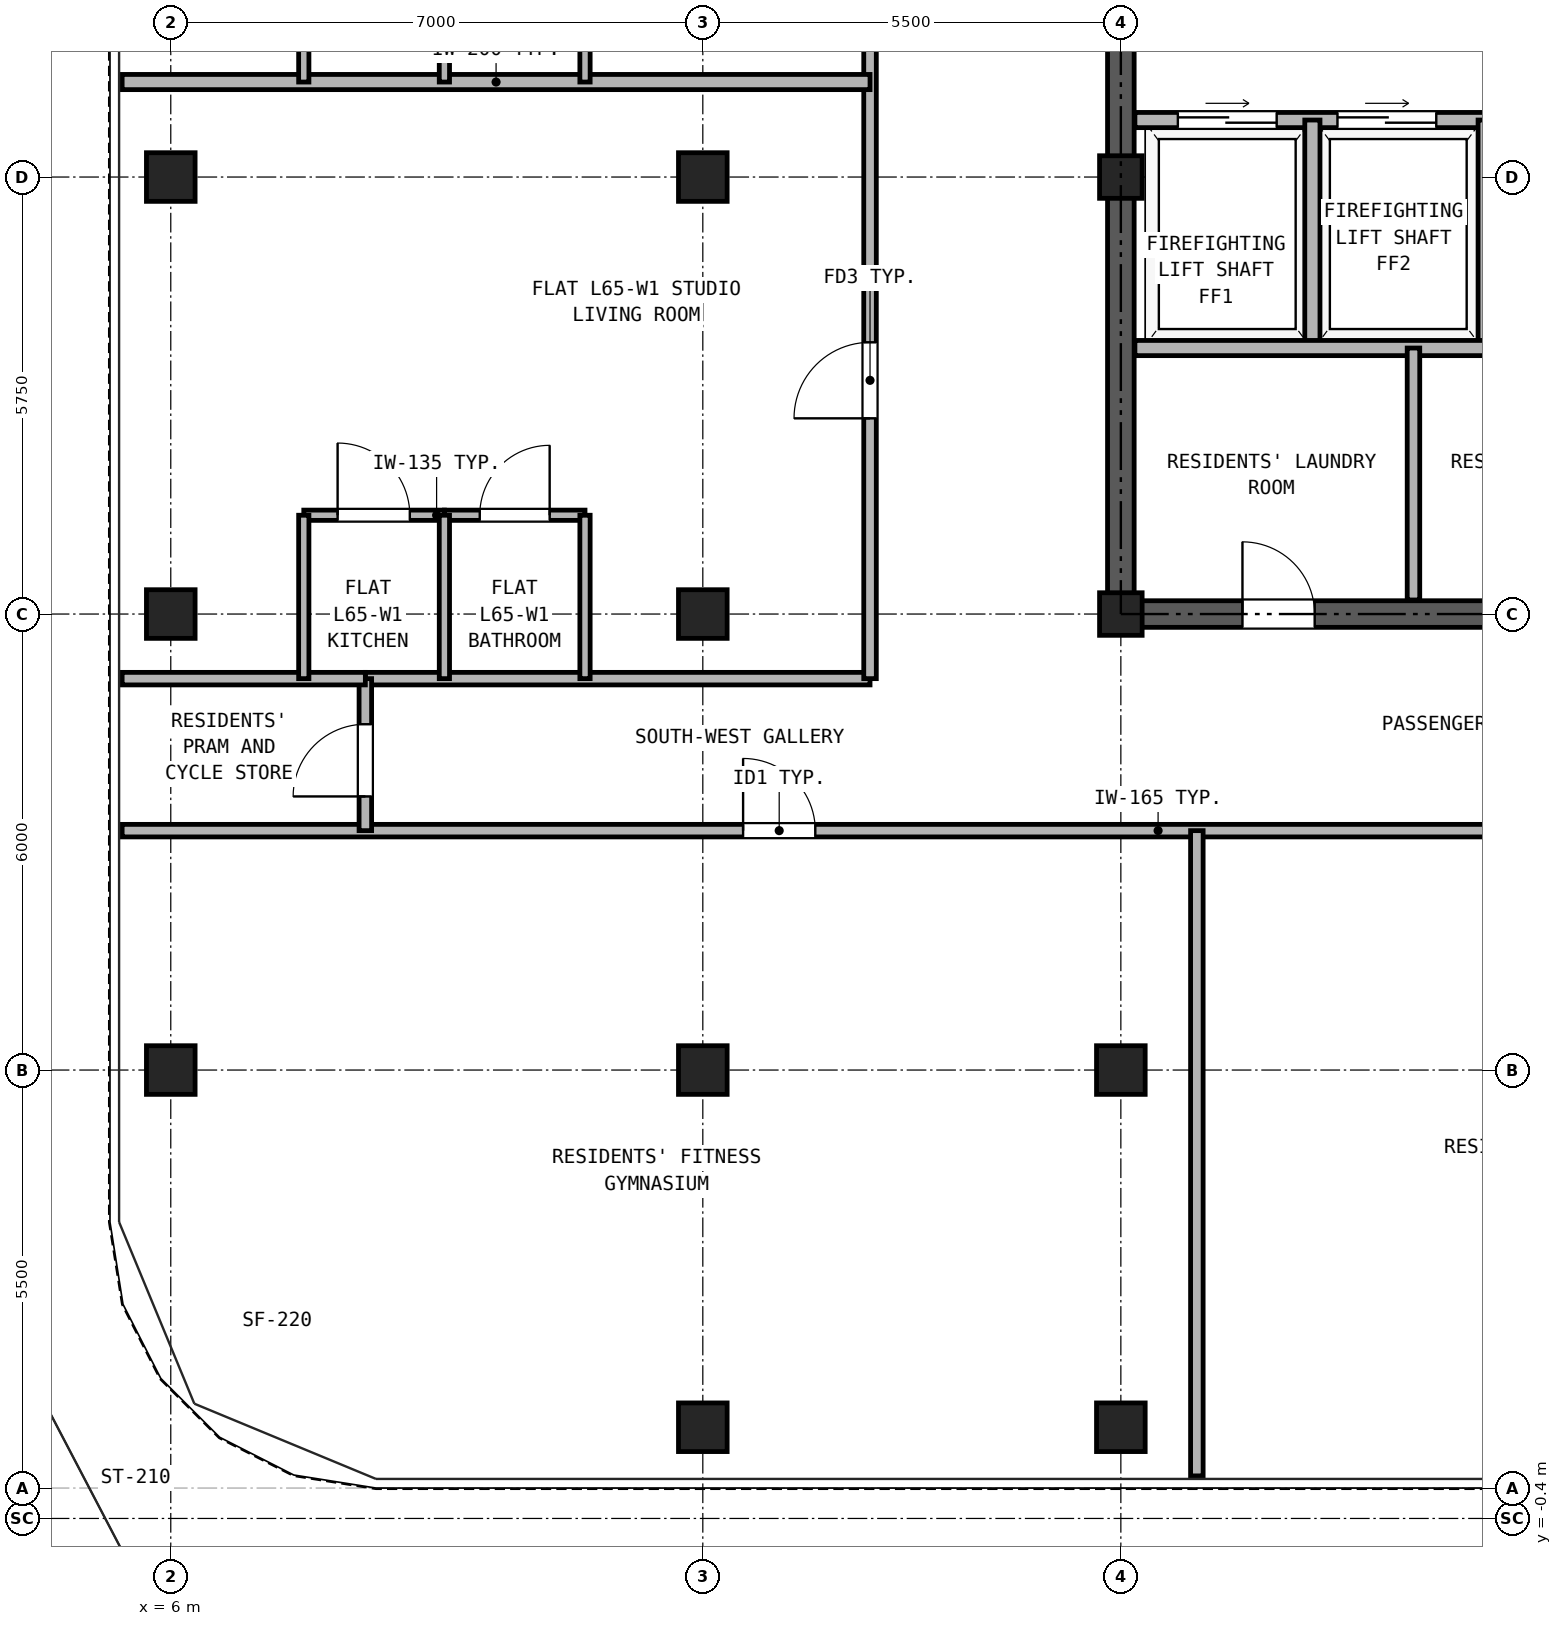
"""IFC4 building model, lengths in metres.
Left out: names, types, materials, properties, quantities, classifications, styles, units other than length and angle.
Written with IfcOpenShell. Run it as: python <this file> out.ifc"""

import sys

from ifc_helpers import new_model, si_unit, direction, frame, frame_2d, origin, origin_2d, place, context, subcontext, project, spatial, rectangle, hollow_rectangle, extrude, source, transform, mapped, element, fill, save


model = new_model("IFC4")
c1 = context("Model", 3, precision=1e-05, world=origin(), true_north=direction((0.0, 1.0)))
c2 = subcontext(c1, "Body", "Model", "MODEL_VIEW")
j1 = project(units=[si_unit("LENGTHUNIT", "METRE"), si_unit("PLANEANGLEUNIT", "RADIAN")], contexts=[c1])
p1 = place(None, origin())
s1 = spatial("IfcSite", under=j1, at=p1, CompositionType="ELEMENT")
p2 = place(p1, origin())
s2 = spatial("IfcBuilding", under=s1, at=p2, CompositionType="ELEMENT")
p3 = place(p2, frame((0.0, 0.0, 229.7)))
s3 = spatial("IfcBuildingStorey", under=s2, at=p3, CompositionType="ELEMENT", Elevation=229.7)
m1 = source(origin(), c2, "Body", "SweptSolid", [
    extrude(hollow_rectangle(XDim=0.64, YDim=0.64, WallThickness=0.035, at=origin_2d()), origin(), (0.0, 0.0, 1.0), 2.98),
])
for number, where, z_axis, x_axis in (
    (1, (13.0, 0.8, 0.0), (0.0, 0.0, 1.0), (1.0, 0.0, 0.0)),
    (2, (18.5, 0.8, 0.0), (0.0, 0.0, 1.0), (1.0, 0.0, 0.0)),
    (3, (6.0, 5.5, 0.0), (0.0, 0.0, 1.0), (1.0, 0.0, 0.0)),
    (4, (6.0, 11.5, 0.0), (0.0, 0.0, 1.0), (1.0, 0.0, 0.0)),
    (5, (6.0, 17.25, 0.0), (0.0, 0.0, 1.0), (1.0, 0.0, 0.0)),
    (6, (13.0, 5.5, 0.0), (0.0, 0.0, 1.0), (1.0, 0.0, 0.0)),
    (7, (13.0, 11.5, 0.0), (0.0, 0.0, 1.0), (1.0, 0.0, 0.0)),
    (8, (13.0, 17.25, 0.0), (0.0, 0.0, 1.0), (1.0, 0.0, 0.0)),
    (9, (18.5, 5.5, 0.0), (0.0, 0.0, 1.0), (1.0, 0.0, 0.0)),
):
    element("IfcColumn", number, at=place(p3, frame(where, z_axis=z_axis, x_axis=x_axis)), inside=s3, PredefinedType="COLUMN", context=c2, shape_type="MappedRepresentation", body=[
        mapped(m1, transform((0.0, 0.0, 0.0), x_axis=(1.0, 0.0, 0.0), y_axis=(0.0, 1.0, 0.0), z_axis=(0.0, 0.0, 1.0), scale=1.0)),
    ])
m2 = source(origin(), c2, "Body", "SweptSolid", [
    extrude(hollow_rectangle(XDim=0.56, YDim=0.56, WallThickness=0.03, at=origin_2d()), origin(), (0.0, 0.0, 1.0), 2.98),
])
for number, where, z_axis, x_axis in (
    (10, (18.5, 11.5, 0.0), (0.0, 0.0, 1.0), (1.0, 0.0, 0.0)),
    (11, (18.5, 17.25, 0.0), (0.0, 0.0, 1.0), (1.0, 0.0, 0.0)),
):
    element("IfcColumn", number, at=place(p3, frame(where, z_axis=z_axis, x_axis=x_axis)), inside=s3, PredefinedType="COLUMN", context=c2, shape_type="MappedRepresentation", body=[
        mapped(m2, transform((0.0, 0.0, 0.0), x_axis=(1.0, 0.0, 0.0), y_axis=(0.0, 1.0, 0.0), z_axis=(0.0, 0.0, 1.0), scale=1.0)),
    ])
p4 = place(p3, frame((18.325, 11.5, 0.0), z_axis=(0.0, 0.0, 1.0), x_axis=(1.0, 0.0, 0.0)))
e12 = element("IfcWall", 12, at=p4, inside=s3, PredefinedType="SHEAR", context=c2, shape_type="SweptSolid", body=[
    extrude(rectangle(XDim=10.35, YDim=0.35, at=frame_2d((5.175, 0.0))), origin(), (0.0, 0.0, 1.0), 2.98),
])
p5 = place(p4, frame((1.775, 0.0, 0.0)))
e13 = element("IfcOpeningElement", 13, at=p5, cuts=e12, PredefinedType="OPENING", context=c2, shape_type="SweptSolid", body=[
    extrude(rectangle(XDim=0.95, YDim=2.15, at=frame_2d((0.475, 1.075))), frame((0.0, 0.185, 0.0), z_axis=(0.0, -1.0, 0.0), x_axis=(1.0, 0.0, 0.0)), (0.0, 0.0, 1.0), 0.37),
])
p6 = place(p4, frame((5.275, 0.0, 0.0)))
e14 = element("IfcOpeningElement", 14, at=p6, cuts=e12, PredefinedType="OPENING", context=c2, shape_type="SweptSolid", body=[
    extrude(rectangle(XDim=0.95, YDim=2.15, at=frame_2d((0.475, 1.075))), frame((0.0, 0.185, 0.0), z_axis=(0.0, -1.0, 0.0), x_axis=(1.0, 0.0, 0.0)), (0.0, 0.0, 1.0), 0.37),
])
p7 = place(p4, frame((8.175, 0.0, 0.0)))
e15 = element("IfcOpeningElement", 15, at=p7, cuts=e12, PredefinedType="OPENING", context=c2, shape_type="SweptSolid", body=[
    extrude(rectangle(XDim=1.1, YDim=2.25, at=frame_2d((0.55, 1.125))), frame((0.0, 0.185, 0.0), z_axis=(0.0, -1.0, 0.0), x_axis=(1.0, 0.0, 0.0)), (0.0, 0.0, 1.0), 0.37),
])
p8 = place(p3, frame((18.5, 11.675, 0.0), z_axis=(0.0, 0.0, 1.0), x_axis=(0.0, 1.0, 0.0)))
e16 = element("IfcWall", 16, at=p8, inside=s3, PredefinedType="SHEAR", context=c2, shape_type="SweptSolid", body=[
    extrude(rectangle(XDim=16.9, YDim=0.35, at=frame_2d((8.45, 0.0))), origin(), (0.0, 0.0, 1.0), 2.98),
])
p9 = place(p8, frame((7.475, 0.0, 0.0)))
e17 = element("IfcOpeningElement", 17, at=p9, cuts=e16, PredefinedType="OPENING", context=c2, shape_type="SweptSolid", body=[
    extrude(rectangle(XDim=1.15, YDim=2.2, at=frame_2d((0.575, 1.1))), frame((0.0, 0.185, 0.0), z_axis=(0.0, -1.0, 0.0), x_axis=(1.0, 0.0, 0.0)), (0.0, 0.0, 1.0), 0.37),
])
p10 = place(p3, frame((18.685, 18.0, 0.0), z_axis=(0.0, 0.0, 1.0), x_axis=(1.0, 0.0, 0.0)))
e18 = element("IfcWall", 18, at=p10, inside=s3, PredefinedType="PARTITIONING", context=c2, shape_type="SweptSolid", body=[
    extrude(rectangle(XDim=9.63, YDim=0.2, at=frame_2d((4.815, 0.0))), origin(), (0.0, 0.0, 1.0), 2.98),
])
p11 = place(p10, frame((0.565, 0.0, 0.0)))
e19 = element("IfcOpeningElement", 19, at=p11, cuts=e18, PredefinedType="OPENING", context=c2, shape_type="SweptSolid", body=[
    extrude(rectangle(XDim=1.3, YDim=2.3, at=frame_2d((0.65, 1.15))), frame((0.0, 0.11, 0.0), z_axis=(0.0, -1.0, 0.0), x_axis=(1.0, 0.0, 0.0)), (0.0, 0.0, 1.0), 0.22),
])
p12 = place(p10, frame((2.665, 0.0, 0.0)))
e20 = element("IfcOpeningElement", 20, at=p12, cuts=e18, PredefinedType="OPENING", context=c2, shape_type="SweptSolid", body=[
    extrude(rectangle(XDim=1.3, YDim=2.3, at=frame_2d((0.65, 1.15))), frame((0.0, 0.11, 0.0), z_axis=(0.0, -1.0, 0.0), x_axis=(1.0, 0.0, 0.0)), (0.0, 0.0, 1.0), 0.22),
])
p13 = place(p10, frame((7.165, 0.0, 0.0)))
e21 = element("IfcOpeningElement", 21, at=p13, cuts=e18, PredefinedType="OPENING", context=c2, shape_type="SweptSolid", body=[
    extrude(rectangle(XDim=1.0, YDim=2.15, at=frame_2d((0.5, 1.075))), frame((0.0, 0.11, 0.0), z_axis=(0.0, -1.0, 0.0), x_axis=(1.0, 0.0, 0.0)), (0.0, 0.0, 1.0), 0.22),
])
for number, where, z_axis, x_axis in (
    (22, (21.02, 15.0, 0.0), (0.0, 0.0, 1.0), (0.0, 1.0, 0.0)),
    (23, (23.3, 15.0, 0.0), (0.0, 0.0, 1.0), (0.0, 1.0, 0.0)),
):
    element("IfcWall", number, at=place(p3, frame(where, z_axis=z_axis, x_axis=x_axis)), inside=s3, PredefinedType="PARTITIONING", context=c2, shape_type="SweptSolid", body=[
        extrude(rectangle(XDim=3.0, YDim=0.2, at=frame_2d((1.5, 0.0))), origin(), (0.0, 0.0, 1.0), 2.98),
    ])
p14 = place(p3, frame((18.685, 15.0, 0.0), z_axis=(0.0, 0.0, 1.0), x_axis=(1.0, 0.0, 0.0)))
e24 = element("IfcWall", 24, at=p14, inside=s3, PredefinedType="PARTITIONING", context=c2, shape_type="SweptSolid", body=[
    extrude(rectangle(XDim=9.63, YDim=0.2, at=frame_2d((4.815, 0.0))), origin(), (0.0, 0.0, 1.0), 2.98),
])
p15 = place(p3, frame((22.35, 11.685, 0.0), z_axis=(0.0, 0.0, 1.0), x_axis=(0.0, 1.0, 0.0)))
e25 = element("IfcWall", 25, at=p15, inside=s3, PredefinedType="PARTITIONING", context=c2, shape_type="SweptSolid", body=[
    extrude(rectangle(XDim=3.315, YDim=0.165, at=frame_2d((1.657, 0.0))), origin(), (0.0, 0.0, 1.0), 2.98),
])
p16 = place(p3, frame((5.36, 8.65, 0.0), z_axis=(0.0, 0.0, 1.0), x_axis=(1.0, 0.0, 0.0)))
e26 = element("IfcWall", 26, at=p16, inside=s3, PredefinedType="PARTITIONING", context=c2, shape_type="SweptSolid", body=[
    extrude(rectangle(XDim=36.28, YDim=0.165, at=frame_2d((18.14, 0.0))), origin(), (0.0, 0.0, 1.0), 2.655),
])
p17 = place(p16, frame((8.17, 0.0, 0.0)))
e27 = element("IfcOpeningElement", 27, at=p17, cuts=e26, PredefinedType="OPENING", context=c2, shape_type="SweptSolid", body=[
    extrude(rectangle(XDim=0.95, YDim=2.15, at=frame_2d((0.475, 1.075))), frame((0.0, 0.093, 0.0), z_axis=(0.0, -1.0, 0.0), x_axis=(1.0, 0.0, 0.0)), (0.0, 0.0, 1.0), 0.185),
])
p18 = place(p16, frame((18.14, 0.0, 0.0)))
e28 = element("IfcOpeningElement", 28, at=p18, cuts=e26, PredefinedType="OPENING", context=c2, shape_type="SweptSolid", body=[
    extrude(rectangle(XDim=0.95, YDim=2.15, at=frame_2d((0.475, 1.075))), frame((0.0, 0.093, 0.0), z_axis=(0.0, -1.0, 0.0), x_axis=(1.0, 0.0, 0.0)), (0.0, 0.0, 1.0), 0.185),
])
p19 = place(p16, frame((25.14, 0.0, 0.0)))
e29 = element("IfcOpeningElement", 29, at=p19, cuts=e26, PredefinedType="OPENING", context=c2, shape_type="SweptSolid", body=[
    extrude(rectangle(XDim=0.95, YDim=2.15, at=frame_2d((0.475, 1.075))), frame((0.0, 0.093, 0.0), z_axis=(0.0, -1.0, 0.0), x_axis=(1.0, 0.0, 0.0)), (0.0, 0.0, 1.0), 0.185),
])
p20 = place(p16, frame((29.99, 0.0, 0.0)))
e30 = element("IfcOpeningElement", 30, at=p20, cuts=e26, PredefinedType="OPENING", context=c2, shape_type="SweptSolid", body=[
    extrude(rectangle(XDim=0.95, YDim=2.15, at=frame_2d((0.475, 1.075))), frame((0.0, 0.093, 0.0), z_axis=(0.0, -1.0, 0.0), x_axis=(1.0, 0.0, 0.0)), (0.0, 0.0, 1.0), 0.185),
])
p21 = place(p3, frame((8.56, 10.65, 0.0), z_axis=(0.0, 0.0, 1.0), x_axis=(1.0, 0.0, 0.0)))
e31 = element("IfcWall", 31, at=p21, inside=s3, PredefinedType="PARTITIONING", context=c2, shape_type="SweptSolid", body=[
    extrude(rectangle(XDim=6.64, YDim=0.165, at=frame_2d((3.32, 0.0))), origin(), (0.0, 0.0, 1.0), 2.98),
])
p22 = place(p3, frame((8.56, 8.65, 0.0), z_axis=(0.0, 0.0, 1.0), x_axis=(0.0, 1.0, 0.0)))
e32 = element("IfcWall", 32, at=p22, inside=s3, PredefinedType="PARTITIONING", context=c2, shape_type="SweptSolid", body=[
    extrude(rectangle(XDim=2.0, YDim=0.165, at=frame_2d((1.0, 0.0))), origin(), (0.0, 0.0, 1.0), 2.98),
])
p23 = place(p22, frame((0.45, 0.0, 0.0)))
e33 = element("IfcOpeningElement", 33, at=p23, cuts=e32, PredefinedType="OPENING", context=c2, shape_type="SweptSolid", body=[
    extrude(rectangle(XDim=0.95, YDim=2.15, at=frame_2d((0.475, 1.075))), frame((0.0, 0.093, 0.0), z_axis=(0.0, -1.0, 0.0), x_axis=(1.0, 0.0, 0.0)), (0.0, 0.0, 1.0), 0.185),
])
p24 = place(p3, frame((15.2, 10.65, 0.0), z_axis=(0.0, 0.0, 1.0), x_axis=(0.0, 1.0, 0.0)))
e34 = element("IfcWall", 34, at=p24, inside=s3, PredefinedType="PARTITIONING", context=c2, shape_type="SweptSolid", body=[
    extrude(rectangle(XDim=24.49, YDim=0.165, at=frame_2d((12.245, 0.0))), origin(), (0.0, 0.0, 1.0), 2.98),
])
p25 = place(p24, frame((3.425, 0.0, 0.0)))
e35 = element("IfcOpeningElement", 35, at=p25, cuts=e34, PredefinedType="OPENING", context=c2, shape_type="SweptSolid", body=[
    extrude(rectangle(XDim=1.0, YDim=2.15, at=frame_2d((0.5, 1.075))), frame((0.0, 0.093, 0.0), z_axis=(0.0, -1.0, 0.0), x_axis=(1.0, 0.0, 0.0)), (0.0, 0.0, 1.0), 0.185),
])
p26 = place(p24, frame((11.5, 0.0, 0.0)))
e36 = element("IfcOpeningElement", 36, at=p26, cuts=e34, PredefinedType="OPENING", context=c2, shape_type="SweptSolid", body=[
    extrude(rectangle(XDim=1.0, YDim=2.15, at=frame_2d((0.5, 1.075))), frame((0.0, 0.093, 0.0), z_axis=(0.0, -1.0, 0.0), x_axis=(1.0, 0.0, 0.0)), (0.0, 0.0, 1.0), 0.185),
])
p27 = place(p24, frame((18.15, 0.0, 0.0)))
e37 = element("IfcOpeningElement", 37, at=p27, cuts=e34, PredefinedType="OPENING", context=c2, shape_type="SweptSolid", body=[
    extrude(rectangle(XDim=1.0, YDim=2.15, at=frame_2d((0.5, 1.075))), frame((0.0, 0.093, 0.0), z_axis=(0.0, -1.0, 0.0), x_axis=(1.0, 0.0, 0.0)), (0.0, 0.0, 1.0), 0.185),
])
p28 = place(p3, frame((19.5, 0.16, 0.0), z_axis=(0.0, 0.0, 1.0), x_axis=(0.0, 1.0, 0.0)))
e38 = element("IfcWall", 38, at=p28, inside=s3, PredefinedType="PARTITIONING", context=c2, shape_type="SweptSolid", body=[
    extrude(rectangle(XDim=8.49, YDim=0.165, at=frame_2d((4.245, 0.0))), origin(), (0.0, 0.0, 1.0), 2.98),
])
p29 = place(p3, frame((5.36, 10.65, 0.0), z_axis=(0.0, 0.0, 1.0), x_axis=(1.0, 0.0, 0.0)))
e39 = element("IfcWall", 39, at=p29, inside=s3, PredefinedType="PARTITIONING", context=c2, shape_type="SweptSolid", body=[
    extrude(rectangle(XDim=3.2, YDim=0.165, at=frame_2d((1.6, 0.0))), origin(), (0.0, 0.0, 1.0), 2.98),
])
p30 = place(p3, frame((7.75, 12.8, 0.0), z_axis=(0.0, 0.0, 1.0), x_axis=(1.0, 0.0, 0.0)))
e40 = element("IfcWall", 40, at=p30, inside=s3, PredefinedType="PARTITIONING", context=c2, shape_type="SweptSolid", body=[
    extrude(rectangle(XDim=1.85, YDim=0.135, at=frame_2d((0.925, 0.0))), origin(), (0.0, 0.0, 1.0), 2.98),
])
p31 = place(p30, frame((0.445, 0.0, 0.0)))
e41 = element("IfcOpeningElement", 41, at=p31, cuts=e40, PredefinedType="OPENING", context=c2, shape_type="SweptSolid", body=[
    extrude(rectangle(XDim=0.95, YDim=2.15, at=frame_2d((0.475, 1.075))), frame((0.0, 0.077, 0.0), z_axis=(0.0, -1.0, 0.0), x_axis=(1.0, 0.0, 0.0)), (0.0, 0.0, 1.0), 0.155),
])
p32 = place(p3, frame((9.6, 12.8, 0.0), z_axis=(0.0, 0.0, 1.0), x_axis=(1.0, 0.0, 0.0)))
e42 = element("IfcWall", 42, at=p32, inside=s3, PredefinedType="PARTITIONING", context=c2, shape_type="SweptSolid", body=[
    extrude(rectangle(XDim=1.85, YDim=0.135, at=frame_2d((0.925, 0.0))), origin(), (0.0, 0.0, 1.0), 2.98),
])
p33 = place(p32, frame((0.465, 0.0, 0.0)))
e43 = element("IfcOpeningElement", 43, at=p33, cuts=e42, PredefinedType="OPENING", context=c2, shape_type="SweptSolid", body=[
    extrude(rectangle(XDim=0.92, YDim=2.1, at=frame_2d((0.46, 1.05))), frame((0.0, 0.077, 0.0), z_axis=(0.0, -1.0, 0.0), x_axis=(1.0, 0.0, 0.0)), (0.0, 0.0, 1.0), 0.155),
])
for number, where, z_axis, x_axis in (
    (44, (7.75, 10.65, 0.0), (0.0, 0.0, 1.0), (0.0, 1.0, 0.0)),
    (45, (9.6, 10.65, 0.0), (0.0, 0.0, 1.0), (0.0, 1.0, 0.0)),
    (46, (11.45, 10.65, 0.0), (0.0, 0.0, 1.0), (0.0, 1.0, 0.0)),
):
    element("IfcWall", number, at=place(p3, frame(where, z_axis=z_axis, x_axis=x_axis)), inside=s3, PredefinedType="PARTITIONING", context=c2, shape_type="SweptSolid", body=[
        extrude(rectangle(XDim=2.15, YDim=0.135, at=frame_2d((1.075, 0.0))), origin(), (0.0, 0.0, 1.0), 2.98),
    ])
p34 = place(p3, frame((5.36, 18.5, 0.0), z_axis=(0.0, 0.0, 1.0), x_axis=(1.0, 0.0, 0.0)))
e47 = element("IfcWall", 47, at=p34, inside=s3, PredefinedType="PARTITIONING", context=c2, shape_type="SweptSolid", body=[
    extrude(rectangle(XDim=9.84, YDim=0.2, at=frame_2d((4.92, 0.0))), origin(), (0.0, 0.0, 1.0), 2.98),
])
for number, where, z_axis, x_axis in (
    (48, (7.75, 18.5, 0.0), (0.0, 0.0, 1.0), (0.0, 1.0, 0.0)),
    (49, (9.6, 18.5, 0.0), (0.0, 0.0, 1.0), (0.0, 1.0, 0.0)),
    (50, (11.45, 18.5, 0.0), (0.0, 0.0, 1.0), (0.0, 1.0, 0.0)),
):
    element("IfcWall", number, at=place(p3, frame(where, z_axis=z_axis, x_axis=x_axis)), inside=s3, PredefinedType="PARTITIONING", context=c2, shape_type="SweptSolid", body=[
        extrude(rectangle(XDim=2.15, YDim=0.135, at=frame_2d((1.075, 0.0))), origin(), (0.0, 0.0, 1.0), 2.98),
    ])
p35 = place(p11, origin())
e51 = element("IfcDoor", 51, at=p35, inside=s3, OperationType="DOUBLE_DOOR_SLIDING", PredefinedType="DOOR", context=c2, shape_type="SweptSolid", body=[
    extrude(rectangle(XDim=1.3, YDim=2.3, at=frame_2d((0.65, 1.15))), frame((0.0, 0.025, 0.0), z_axis=(0.0, -1.0, 0.0), x_axis=(1.0, 0.0, 0.0)), (0.0, 0.0, 1.0), 0.05),
])
fill(e19, e51)
p36 = place(p12, origin())
e52 = element("IfcDoor", 52, at=p36, inside=s3, OperationType="DOUBLE_DOOR_SLIDING", PredefinedType="DOOR", context=c2, shape_type="SweptSolid", body=[
    extrude(rectangle(XDim=1.3, YDim=2.3, at=frame_2d((0.65, 1.15))), frame((0.0, 0.025, 0.0), z_axis=(0.0, -1.0, 0.0), x_axis=(1.0, 0.0, 0.0)), (0.0, 0.0, 1.0), 0.05),
])
fill(e20, e52)
p37 = place(p5, frame((0.95, 0.0, 0.0), z_axis=(0.0, 0.0, 1.0), x_axis=(-1.0, 0.0, 0.0)))
e53 = element("IfcDoor", 53, at=p37, inside=s3, OperationType="SINGLE_SWING_LEFT", PredefinedType="DOOR", context=c2, shape_type="SweptSolid", body=[
    extrude(rectangle(XDim=0.95, YDim=2.15, at=frame_2d((0.475, 1.075))), frame((0.0, 0.025, 0.0), z_axis=(0.0, -1.0, 0.0), x_axis=(1.0, 0.0, 0.0)), (0.0, 0.0, 1.0), 0.05),
])
fill(e13, e53)
p38 = place(p17, frame((0.95, 0.0, 0.0), z_axis=(0.0, 0.0, 1.0), x_axis=(-1.0, 0.0, 0.0)))
e54 = element("IfcDoor", 54, at=p38, inside=s3, OperationType="SINGLE_SWING_LEFT", PredefinedType="DOOR", context=c2, shape_type="SweptSolid", body=[
    extrude(rectangle(XDim=0.95, YDim=2.15, at=frame_2d((0.475, 1.075))), frame((0.0, 0.025, 0.0), z_axis=(0.0, -1.0, 0.0), x_axis=(1.0, 0.0, 0.0)), (0.0, 0.0, 1.0), 0.05),
])
fill(e27, e54)
p39 = place(p23, frame((0.95, 0.0, 0.0), z_axis=(0.0, 0.0, 1.0), x_axis=(-1.0, 0.0, 0.0)))
e55 = element("IfcDoor", 55, at=p39, inside=s3, OperationType="SINGLE_SWING_LEFT", PredefinedType="DOOR", context=c2, shape_type="SweptSolid", body=[
    extrude(rectangle(XDim=0.95, YDim=2.15, at=frame_2d((0.475, 1.075))), frame((0.0, 0.025, 0.0), z_axis=(0.0, -1.0, 0.0), x_axis=(1.0, 0.0, 0.0)), (0.0, 0.0, 1.0), 0.05),
])
fill(e33, e55)
p40 = place(p31, origin())
e56 = element("IfcDoor", 56, at=p40, inside=s3, OperationType="SINGLE_SWING_LEFT", PredefinedType="DOOR", context=c2, shape_type="SweptSolid", body=[
    extrude(rectangle(XDim=0.95, YDim=2.15, at=frame_2d((0.475, 1.075))), frame((0.0, 0.025, 0.0), z_axis=(0.0, -1.0, 0.0), x_axis=(1.0, 0.0, 0.0)), (0.0, 0.0, 1.0), 0.05),
])
fill(e41, e56)
p41 = place(p33, origin())
e57 = element("IfcDoor", 57, at=p41, inside=s3, OperationType="SINGLE_SWING_RIGHT", PredefinedType="DOOR", context=c2, shape_type="SweptSolid", body=[
    extrude(rectangle(XDim=0.92, YDim=2.1, at=frame_2d((0.46, 1.05))), frame((0.0, 0.025, 0.0), z_axis=(0.0, -1.0, 0.0), x_axis=(1.0, 0.0, 0.0)), (0.0, 0.0, 1.0), 0.05),
])
fill(e43, e57)
p42 = place(p25, origin())
e58 = element("IfcDoor", 58, at=p42, inside=s3, OperationType="SINGLE_SWING_LEFT", PredefinedType="DOOR", context=c2, shape_type="SweptSolid", body=[
    extrude(rectangle(XDim=1.0, YDim=2.15, at=frame_2d((0.5, 1.075))), frame((0.0, 0.025, 0.0), z_axis=(0.0, -1.0, 0.0), x_axis=(1.0, 0.0, 0.0)), (0.0, 0.0, 1.0), 0.05),
])
fill(e35, e58)
save(model, sys.argv[1])
